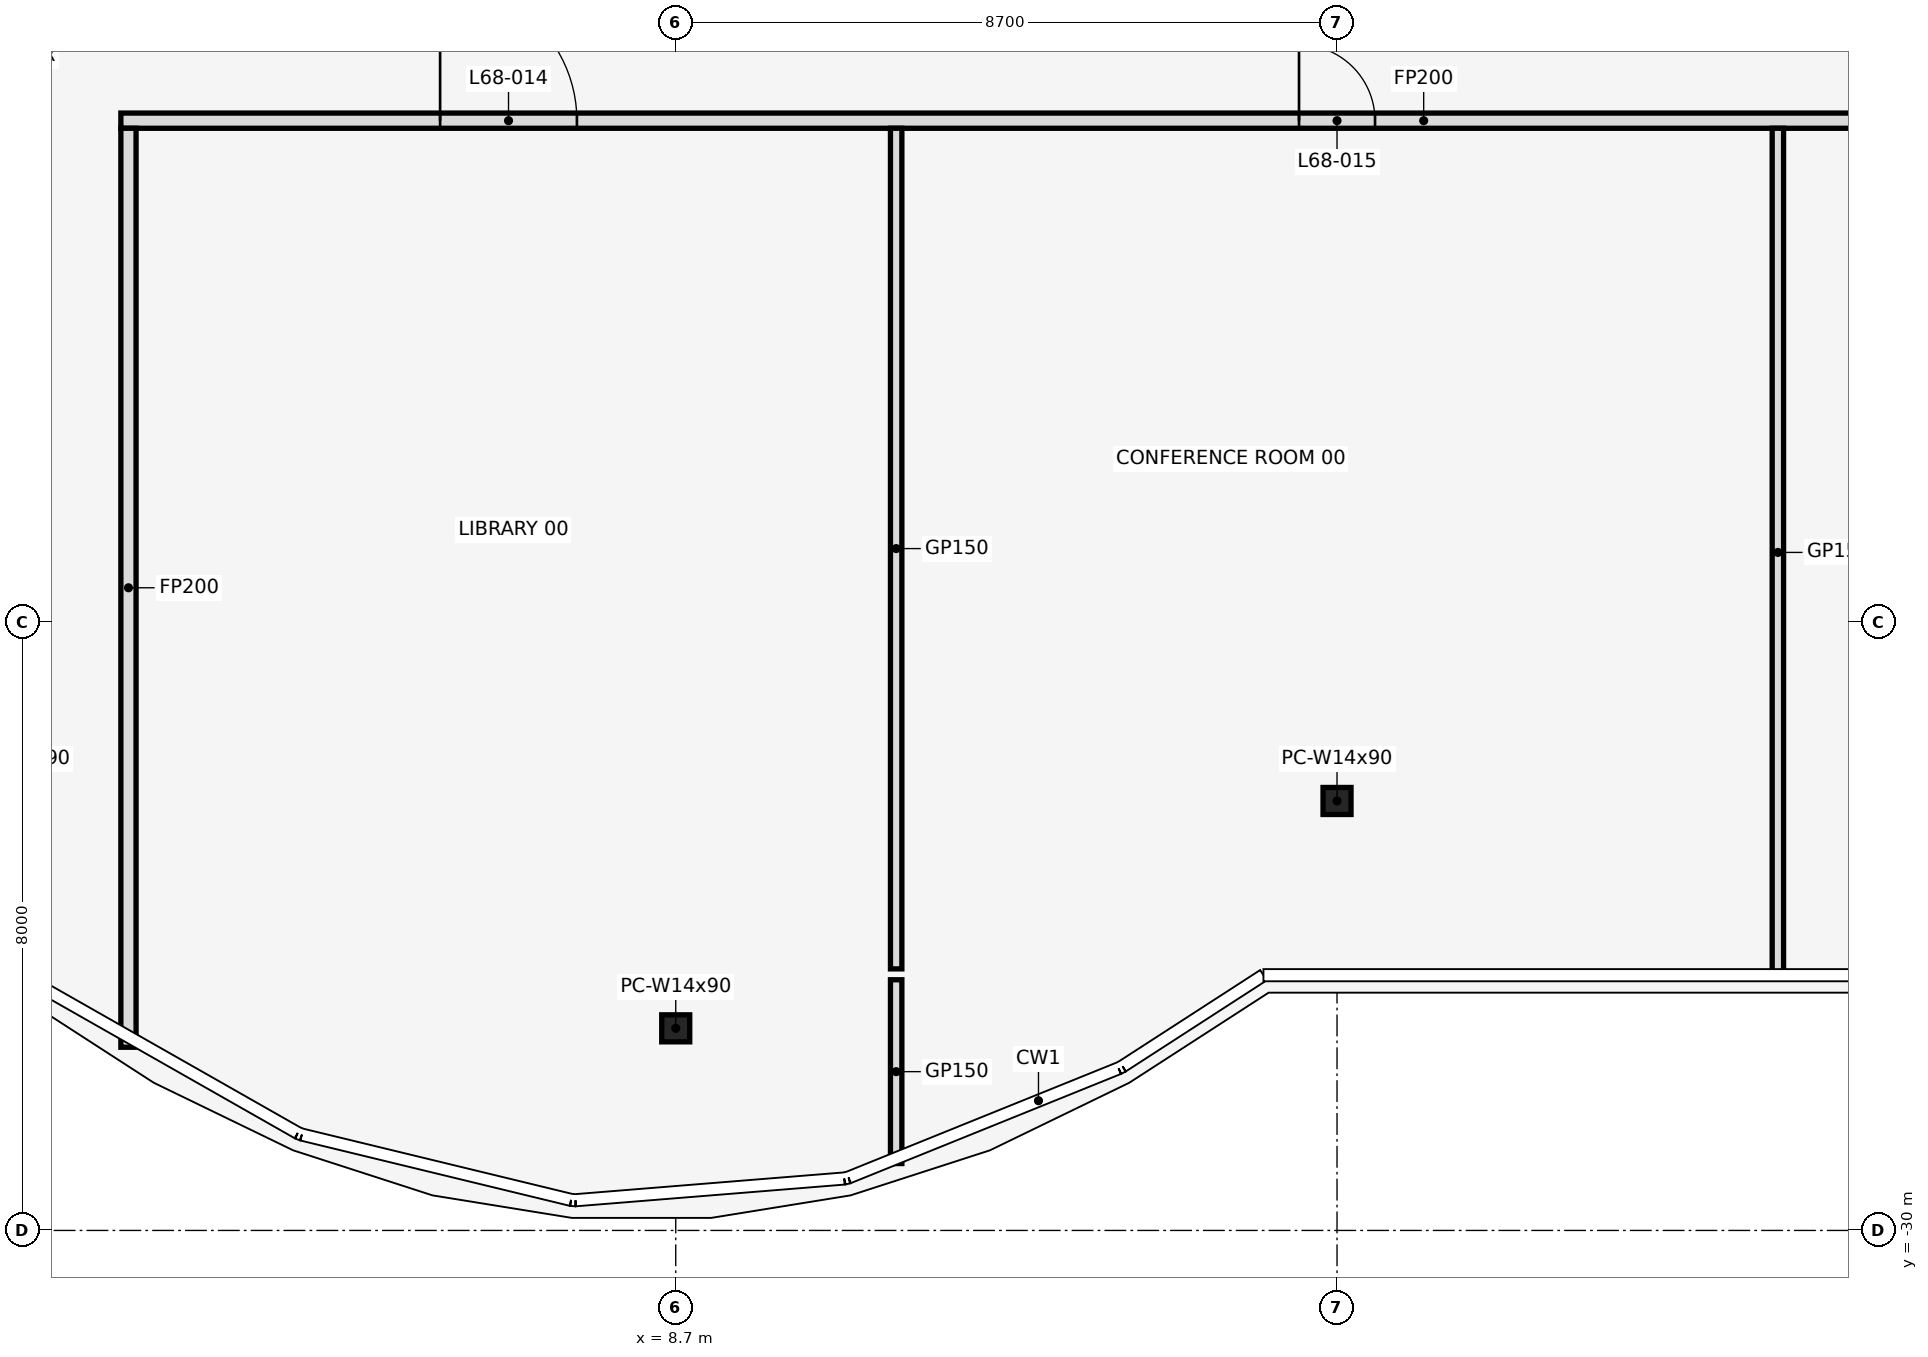
"""IFC4 building model, lengths in metres.
Left out: names, types, materials, properties, quantities, classifications, styles, units other than length and angle.
Written with IfcOpenShell. Run it as: python <this file> out.ifc"""

import sys

from ifc_helpers import new_model, si_unit, direction, frame, frame_2d, origin, origin_2d, place, context, subcontext, project, spatial, rectangle, i_section, extrude, element, fill, save


model = new_model("IFC4")
c1 = context("Model", 3, precision=1e-05, world=origin(), true_north=direction((0.0, 1.0)))
c2 = subcontext(c1, "Body", "Model", "MODEL_VIEW")
j1 = project(units=[si_unit("LENGTHUNIT", "METRE"), si_unit("PLANEANGLEUNIT", "RADIAN")], contexts=[c1])
p1 = place(None, origin())
s1 = spatial("IfcSite", under=j1, at=p1, CompositionType="ELEMENT")
p2 = place(p1, origin())
s2 = spatial("IfcBuilding", under=s1, at=p2, CompositionType="ELEMENT")
p3 = place(p2, frame((0.0, 0.0, 302.0)))
s3 = spatial("IfcBuildingStorey", under=s2, at=p3, CompositionType="ELEMENT", Elevation=302.0)
for number, where, z_axis, x_axis in (
    (1, (8.7, -27.341, 0.0), (0.0, 0.0, 1.0), (1.0, 0.0, 0.0)),
    (2, (17.4, -24.35, 0.0), (0.0, 0.0, 1.0), (1.0, 0.0, 0.0)),
):
    element("IfcColumn", number, at=place(p3, frame(where, z_axis=z_axis, x_axis=x_axis)), inside=s3, PredefinedType="COLUMN", context=c2, shape_type="SweptSolid", body=[
        extrude(i_section(OverallWidth=0.368, OverallDepth=0.356, WebThickness=0.011, FlangeThickness=0.018, at=origin_2d()), origin(), (0.0, 0.0, 1.0), 4.5),
    ])
p4 = place(p3, frame((1.4, -15.4, 0.0), z_axis=(0.0, 0.0, 1.0), x_axis=(1.0, 0.0, 0.0)))
e3 = element("IfcWall", 3, at=p4, inside=s3, PredefinedType="PARTITIONING", context=c2, shape_type="SweptSolid", body=[
    extrude(rectangle(XDim=34.28, YDim=0.2, at=frame_2d((17.14, 0.0))), origin(), (0.0, 0.0, 1.0), 3.418),
])
p5 = place(p4, frame((4.2, 0.0, 0.0)))
e4 = element("IfcOpeningElement", 4, at=p5, cuts=e3, PredefinedType="OPENING", context=c2, shape_type="SweptSolid", body=[
    extrude(rectangle(XDim=1.8, YDim=2.1, at=frame_2d((0.9, 1.05))), frame((0.0, 0.112, 0.0), z_axis=(0.0, -1.0, 0.0), x_axis=(1.0, 0.0, 0.0)), (0.0, 0.0, 1.0), 0.224),
])
p6 = place(p4, frame((15.5, 0.0, 0.0)))
e5 = element("IfcOpeningElement", 5, at=p6, cuts=e3, PredefinedType="OPENING", context=c2, shape_type="SweptSolid", body=[
    extrude(rectangle(XDim=1.0, YDim=2.1, at=frame_2d((0.5, 1.05))), frame((0.0, 0.112, 0.0), z_axis=(0.0, -1.0, 0.0), x_axis=(1.0, 0.0, 0.0)), (0.0, 0.0, 1.0), 0.224),
])
p7 = place(p4, frame((27.1, 0.0, 0.0)))
e6 = element("IfcOpeningElement", 6, at=p7, cuts=e3, PredefinedType="OPENING", context=c2, shape_type="SweptSolid", body=[
    extrude(rectangle(XDim=1.8, YDim=2.1, at=frame_2d((0.9, 1.05))), frame((0.0, 0.112, 0.0), z_axis=(0.0, -1.0, 0.0), x_axis=(1.0, 0.0, 0.0)), (0.0, 0.0, 1.0), 0.224),
])
p8 = place(p3, frame((1.5, -27.59, 0.0), z_axis=(0.0, 0.0, 1.0), x_axis=(0.0, 1.0, 0.0)))
e7 = element("IfcWall", 7, at=p8, inside=s3, PredefinedType="PARTITIONING", context=c2, shape_type="SweptSolid", body=[
    extrude(rectangle(XDim=12.09, YDim=0.2, at=frame_2d((6.045, 0.0))), origin(), (0.0, 0.0, 1.0), 3.418),
])
p9 = place(p3, frame((11.6, -29.12, 0.0), z_axis=(0.0, 0.0, 1.0), x_axis=(0.0, 1.0, 0.0)))
e8 = element("IfcWall", 8, at=p9, inside=s3, PredefinedType="PARTITIONING", context=c2, shape_type="SweptSolid", body=[
    extrude(rectangle(XDim=2.418, YDim=0.15, at=frame_2d((1.209, 0.0))), origin(), (0.0, 0.0, 1.0), 3.418),
])
p10 = place(p3, frame((11.6, -26.559, 0.0), z_axis=(0.0, 0.0, 1.0), x_axis=(0.0, 1.0, 0.0)))
e9 = element("IfcWall", 9, at=p10, inside=s3, PredefinedType="PARTITIONING", context=c2, shape_type="SweptSolid", body=[
    extrude(rectangle(XDim=11.059, YDim=0.15, at=frame_2d((5.53, 0.0))), origin(), (0.0, 0.0, 1.0), 3.418),
])
p11 = place(p3, frame((23.2, -26.66, 0.0), z_axis=(0.0, 0.0, 1.0), x_axis=(0.0, 1.0, 0.0)))
e10 = element("IfcWall", 10, at=p11, inside=s3, PredefinedType="PARTITIONING", context=c2, shape_type="SweptSolid", body=[
    extrude(rectangle(XDim=11.16, YDim=0.15, at=frame_2d((5.58, 0.0))), origin(), (0.0, 0.0, 1.0), 3.418),
])
p12 = place(p5, origin())
e11 = element("IfcDoor", 11, at=p12, inside=s3, OperationType="SINGLE_SWING_LEFT", PredefinedType="DOOR", context=c2, shape_type="SweptSolid", body=[
    extrude(rectangle(XDim=1.8, YDim=2.1, at=frame_2d((0.9, 1.05))), frame((0.0, 0.025, 0.0), z_axis=(0.0, -1.0, 0.0), x_axis=(1.0, 0.0, 0.0)), (0.0, 0.0, 1.0), 0.05),
])
fill(e4, e11)
p13 = place(p6, frame((1.0, 0.0, 0.0), z_axis=(0.0, 0.0, 1.0), x_axis=(-1.0, 0.0, 0.0)))
e12 = element("IfcDoor", 12, at=p13, inside=s3, OperationType="SINGLE_SWING_RIGHT", PredefinedType="DOOR", context=c2, shape_type="SweptSolid", body=[
    extrude(rectangle(XDim=1.0, YDim=2.1, at=frame_2d((0.5, 1.05))), frame((0.0, 0.025, 0.0), z_axis=(0.0, -1.0, 0.0), x_axis=(1.0, 0.0, 0.0)), (0.0, 0.0, 1.0), 0.05),
])
fill(e5, e12)
save(model, sys.argv[1])
